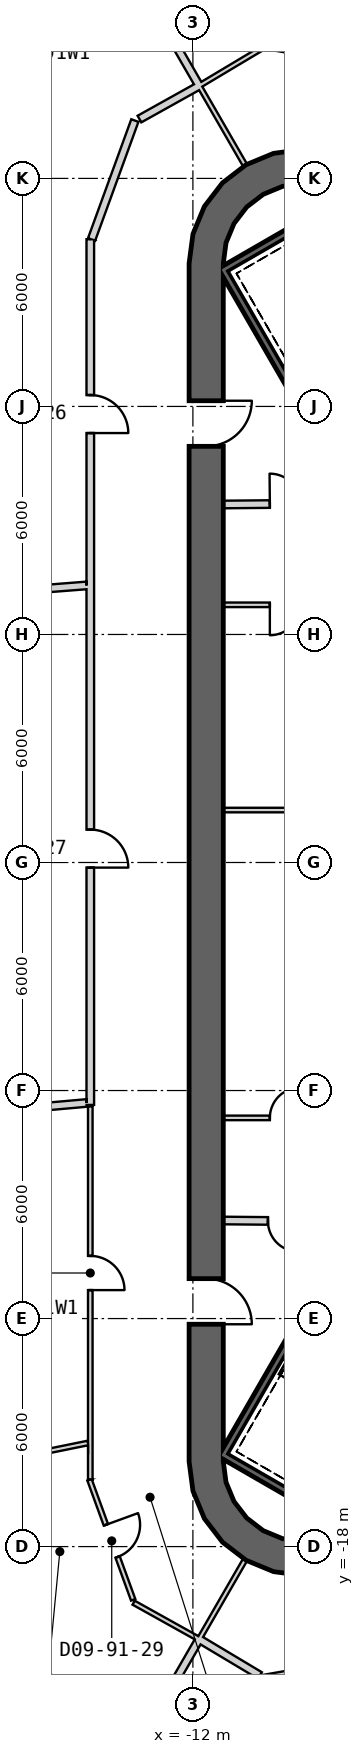
"""IFC4 building model, lengths in metres.
Left out: names, types, materials, properties, quantities, classifications, styles, units other than length and angle.
Written with IfcOpenShell. Run it as: python <this file> out.ifc"""

import sys

from ifc_helpers import new_model, si_unit, direction, frame, frame_2d, origin, place, context, subcontext, project, spatial, polyline, rectangle, outline, extrude, element, fill, save


model = new_model("IFC4")
c1 = context("Model", 3, precision=1e-05, world=origin(), true_north=direction((0.0, 1.0)))
c2 = subcontext(c1, "Body", "Model", "MODEL_VIEW")
j1 = project(units=[si_unit("LENGTHUNIT", "METRE"), si_unit("PLANEANGLEUNIT", "RADIAN")], contexts=[c1])
p1 = place(None, origin())
s1 = spatial("IfcSite", under=j1, at=p1, CompositionType="ELEMENT")
p2 = place(p1, origin())
s2 = spatial("IfcBuilding", under=s1, at=p2, CompositionType="ELEMENT")
p3 = place(p2, frame((0.0, 0.0, 398.3)))
s3 = spatial("IfcBuildingStorey", under=s2, at=p3, CompositionType="ELEMENT", Elevation=398.3)
p4 = place(p3, frame((-11.65, 15.762, 0.0), z_axis=(0.0, 0.0, 1.0), x_axis=(0.0, -1.0, 0.0)))
e1 = element("IfcWall", 1, at=p4, inside=s3, PredefinedType="SHEAR", context=c2, shape_type="SweptSolid", body=[
    extrude(rectangle(XDim=31.523, YDim=0.9, at=frame_2d((15.762, 0.0))), origin(), (0.0, 0.0, 1.0), 6.5),
])
p5 = place(p4, frame((3.612, 0.0, 0.0)))
e2 = element("IfcOpeningElement", 2, at=p5, cuts=e1, PredefinedType="OPENING", context=c2, shape_type="SweptSolid", body=[
    extrude(rectangle(XDim=1.2, YDim=2.4, at=frame_2d((0.6, 1.2))), frame((0.0, 0.46, 0.0), z_axis=(0.0, -1.0, 0.0), x_axis=(1.0, 0.0, 0.0)), (0.0, 0.0, 1.0), 0.92),
])
p6 = place(p4, frame((26.712, 0.0, 0.0)))
e3 = element("IfcOpeningElement", 3, at=p6, cuts=e1, PredefinedType="OPENING", context=c2, shape_type="SweptSolid", body=[
    extrude(rectangle(XDim=1.2, YDim=2.4, at=frame_2d((0.6, 1.2))), frame((0.0, 0.46, 0.0), z_axis=(0.0, -1.0, 0.0), x_axis=(1.0, 0.0, 0.0)), (0.0, 0.0, 1.0), 0.92),
])
p7 = place(p3, origin())
e4 = element("IfcWall", 4, at=p7, inside=s3, PredefinedType="SHEAR", context=c2, shape_type="SweptSolid", body=[
    extrude(outline(polyline([(-7.6, 18.36), (-8.323, 18.659), (-9.1, 18.762), (-9.876, 18.659), (-10.6, 18.36), (-11.221, 17.883), (-11.698, 17.262), (-11.998, 16.538), (-12.1, 15.762), (-11.2, 15.762), (-11.128, 16.305), (-10.919, 16.812), (-10.585, 17.247), (-10.15, 17.58), (-9.644, 17.79), (-9.1, 17.862), (-8.556, 17.79), (-8.05, 17.58), (-7.6, 18.36)])), origin(), (0.0, 0.0, 1.0), 6.5),
])
p8 = place(p3, origin())
e5 = element("IfcWall", 5, at=p8, inside=s3, PredefinedType="SHEAR", context=c2, shape_type="SweptSolid", body=[
    extrude(outline(polyline([(-12.1, -15.762), (-11.998, -16.538), (-11.698, -17.262), (-11.221, -17.883), (-10.6, -18.36), (-9.876, -18.659), (-9.1, -18.762), (-8.323, -18.659), (-7.6, -18.36), (-8.05, -17.58), (-8.556, -17.79), (-9.1, -17.862), (-9.644, -17.79), (-10.15, -17.58), (-10.585, -17.247), (-10.919, -16.812), (-11.128, -16.305), (-11.2, -15.762), (-12.1, -15.762)])), origin(), (0.0, 0.0, 1.0), 6.5),
])
p9 = place(p3, frame((-11.245, 15.678, -0.3), z_axis=(0.0, 0.0, 1.0), x_axis=(0.499977274689, -0.866038523851, 0.0)))
e6 = element("IfcWall", 6, at=p9, inside=s3, PredefinedType="SHEAR", context=c2, shape_type="SweptSolid", body=[
    extrude(rectangle(XDim=8.1, YDim=0.2, at=frame_2d((4.05, 0.0))), origin(), (0.0, 0.0, 1.0), 6.5),
])
for number, where, z_axis, x_axis in (
    (7, (-7.818, 17.541, -0.3), (0.0, 0.0, 1.0), (-0.866, -0.5, 0.0)),
    (8, (-11.282, -15.541, -0.3), (0.0, 0.0, 1.0), (0.866, -0.5, 0.0)),
):
    element("IfcWall", number, at=place(p3, frame(where, z_axis=z_axis, x_axis=x_axis)), inside=s3, PredefinedType="SHEAR", context=c2, shape_type="SweptSolid", body=[
        extrude(rectangle(XDim=3.8, YDim=0.2, at=frame_2d((1.9, 0.0))), origin(), (0.0, 0.0, 1.0), 6.5),
    ])
p10 = place(p3, frame((-7.196, -8.663, -0.3), z_axis=(0.0, 0.0, 1.0), x_axis=(-0.499997992926, -0.866026562566, 0.0)))
e9 = element("IfcWall", 9, at=p10, inside=s3, PredefinedType="SHEAR", context=c2, shape_type="SweptSolid", body=[
    extrude(rectangle(XDim=7.9, YDim=0.2, at=frame_2d((3.95, 0.0))), origin(), (0.0, 0.0, 1.0), 6.5),
])
p11 = place(p3, frame((-7.95, 6.78, 0.0), z_axis=(0.0, 0.0, 1.0), x_axis=(-1.0, 0.0, 0.0)))
e10 = element("IfcWall", 10, at=p11, inside=s3, PredefinedType="PARTITIONING", context=c2, shape_type="SweptSolid", body=[
    extrude(rectangle(XDim=3.25, YDim=0.12, at=frame_2d((1.625, 0.0))), origin(), (0.0, 0.0, 1.0), 6.2),
])
p12 = place(p11, frame((1.225, 0.0, 0.0)))
e11 = element("IfcOpeningElement", 11, at=p12, cuts=e10, PredefinedType="OPENING", context=c2, shape_type="SweptSolid", body=[
    extrude(rectangle(XDim=0.8, YDim=2.1, at=frame_2d((0.4, 1.05))), frame((0.0, 0.07, 0.0), z_axis=(0.0, -1.0, 0.0), x_axis=(1.0, 0.0, 0.0)), (0.0, 0.0, 1.0), 0.14),
])
p13 = place(p3, frame((-7.85, 9.451, 0.0), z_axis=(0.0, 0.0, 1.0), x_axis=(-0.999957167047, -0.009255488683, 0.0)))
e12 = element("IfcWall", 12, at=p13, inside=s3, PredefinedType="PARTITIONING", context=c2, shape_type="SweptSolid", body=[
    extrude(rectangle(XDim=3.35, YDim=0.2, at=frame_2d((1.675, 0.0))), origin(), (0.0, 0.0, 1.0), 6.2),
])
p14 = place(p13, frame((1.325, 0.0, 0.0)))
e13 = element("IfcOpeningElement", 13, at=p14, cuts=e12, PredefinedType="OPENING", context=c2, shape_type="SweptSolid", body=[
    extrude(rectangle(XDim=0.8, YDim=2.1, at=frame_2d((0.4, 1.05))), frame((0.0, 0.11, 0.0), z_axis=(0.0, -1.0, 0.0), x_axis=(1.0, 0.0, 0.0)), (0.0, 0.0, 1.0), 0.22),
])
p15 = place(p3, frame((-7.95, 1.38, 0.0), z_axis=(0.0, 0.0, 1.0), x_axis=(-1.0, 0.0, 0.0)))
e14 = element("IfcWall", 14, at=p15, inside=s3, PredefinedType="PARTITIONING", context=c2, shape_type="SweptSolid", body=[
    extrude(rectangle(XDim=3.25, YDim=0.12, at=frame_2d((1.625, 0.0))), origin(), (0.0, 0.0, 1.0), 6.2),
])
p16 = place(p3, frame((-11.2, -6.72, 0.0), z_axis=(0.0, 0.0, 1.0), x_axis=(1.0, 0.0, 0.0)))
e15 = element("IfcWall", 15, at=p16, inside=s3, PredefinedType="PARTITIONING", context=c2, shape_type="SweptSolid", body=[
    extrude(rectangle(XDim=3.25, YDim=0.12, at=frame_2d((1.625, 0.0))), origin(), (0.0, 0.0, 1.0), 6.2),
])
p17 = place(p16, frame((1.225, 0.0, 0.0)))
e16 = element("IfcOpeningElement", 16, at=p17, cuts=e15, PredefinedType="OPENING", context=c2, shape_type="SweptSolid", body=[
    extrude(rectangle(XDim=0.8, YDim=2.1, at=frame_2d((0.4, 1.05))), frame((0.0, 0.07, 0.0), z_axis=(0.0, -1.0, 0.0), x_axis=(1.0, 0.0, 0.0)), (0.0, 0.0, 1.0), 0.14),
])
p18 = place(p3, frame((-11.2, -9.42, 0.0), z_axis=(0.0, 0.0, 1.0), x_axis=(0.999957467379, -0.009222983926, 0.0)))
e17 = element("IfcWall", 17, at=p18, inside=s3, PredefinedType="PARTITIONING", context=c2, shape_type="SweptSolid", body=[
    extrude(rectangle(XDim=3.15, YDim=0.2, at=frame_2d((1.575, 0.0))), origin(), (0.0, 0.0, 1.0), 6.2),
])
p19 = place(p18, frame((1.175, 0.0, 0.0)))
e18 = element("IfcOpeningElement", 18, at=p19, cuts=e17, PredefinedType="OPENING", context=c2, shape_type="SweptSolid", body=[
    extrude(rectangle(XDim=0.8, YDim=2.1, at=frame_2d((0.4, 1.05))), frame((0.0, 0.11, 0.0), z_axis=(0.0, -1.0, 0.0), x_axis=(1.0, 0.0, 0.0)), (0.0, 0.0, 1.0), 0.22),
])
p20 = place(p3, frame((-14.7, 16.399, 0.0), z_axis=(0.0, 0.0, 1.0), x_axis=(0.0, -1.0, 0.0)))
e19 = element("IfcWall", 19, at=p20, inside=s3, PredefinedType="PARTITIONING", context=c2, shape_type="SweptSolid", body=[
    extrude(rectangle(XDim=9.078, YDim=0.2, at=frame_2d((4.539, 0.0))), origin(), (0.0, 0.0, 1.0), 5.57),
])
p21 = place(p20, frame((4.1, 0.0, 0.0)))
e20 = element("IfcOpeningElement", 20, at=p21, cuts=e19, PredefinedType="OPENING", context=c2, shape_type="SweptSolid", body=[
    extrude(rectangle(XDim=1.0, YDim=2.1, at=frame_2d((0.5, 1.05))), frame((0.0, 0.11, 0.0), z_axis=(0.0, -1.0, 0.0), x_axis=(1.0, 0.0, 0.0)), (0.0, 0.0, 1.0), 0.22),
])
p22 = place(p3, frame((-14.7, 7.322, 0.0), z_axis=(0.0, 0.0, 1.0), x_axis=(0.0, -1.0, 0.0)))
e21 = element("IfcWall", 21, at=p22, inside=s3, PredefinedType="PARTITIONING", context=c2, shape_type="SweptSolid", body=[
    extrude(rectangle(XDim=13.701, YDim=0.2, at=frame_2d((6.851, 0.0))), origin(), (0.0, 0.0, 1.0), 5.67),
])
p23 = place(p22, frame((6.456, 0.0, 0.0)))
e22 = element("IfcOpeningElement", 22, at=p23, cuts=e21, PredefinedType="OPENING", context=c2, shape_type="SweptSolid", body=[
    extrude(rectangle(XDim=1.0, YDim=2.1, at=frame_2d((0.5, 1.05))), frame((0.0, 0.11, 0.0), z_axis=(0.0, -1.0, 0.0), x_axis=(1.0, 0.0, 0.0)), (0.0, 0.0, 1.0), 0.22),
])
p24 = place(p3, frame((-13.527, 19.522, 0.0), z_axis=(0.0, 0.0, 1.0), x_axis=(-0.341978542333, -0.939707761266, 0.0)))
e23 = element("IfcWall", 23, at=p24, inside=s3, PredefinedType="PARTITIONING", context=c2, shape_type="SweptSolid", body=[
    extrude(rectangle(XDim=3.33, YDim=0.2, at=frame_2d((1.665, 0.0))), origin(), (0.0, 0.0, 1.0), 5.57),
])
p25 = place(p3, frame((-11.808, 20.452, 0.0), z_axis=(0.0, 0.0, 1.0), x_axis=(-0.873514477635, -0.486798169021, 0.0)))
e24 = element("IfcWall", 24, at=p25, inside=s3, PredefinedType="PARTITIONING", context=c2, shape_type="SweptSolid", body=[
    extrude(rectangle(XDim=1.83, YDim=0.2, at=frame_2d((0.915, 0.0))), origin(), (0.0, 0.0, 1.0), 5.57),
])
p26 = place(p3, frame((-14.7, -6.419, 0.0), z_axis=(0.0, 0.0, 1.0), x_axis=(0.0, -1.0, 0.0)))
e25 = element("IfcWall", 25, at=p26, inside=s3, PredefinedType="PARTITIONING", context=c2, shape_type="SweptSolid", body=[
    extrude(rectangle(XDim=8.835, YDim=0.12, at=frame_2d((4.418, 0.0))), origin(), (0.0, 0.0, 1.0), 5.57),
])
p27 = place(p26, frame((3.932, 0.0, 0.0)))
e26 = element("IfcOpeningElement", 26, at=p27, cuts=e25, PredefinedType="OPENING", context=c2, shape_type="SweptSolid", body=[
    extrude(rectangle(XDim=0.9, YDim=2.1, at=frame_2d((0.45, 1.05))), frame((0.0, 0.07, 0.0), z_axis=(0.0, -1.0, 0.0), x_axis=(1.0, 0.0, 0.0)), (0.0, 0.0, 1.0), 0.14),
])
p28 = place(p3, frame((-14.7, -15.255, 0.0), z_axis=(0.0, 0.0, 1.0), x_axis=(0.0, -1.0, 0.0)))
e27 = element("IfcWall", 27, at=p28, inside=s3, PredefinedType="PARTITIONING", context=c2, shape_type="SweptSolid", body=[
    extrude(rectangle(XDim=0.985, YDim=0.12, at=frame_2d((0.492, 0.0))), origin(), (0.0, 0.0, 1.0), 6.2),
])
p29 = place(p3, frame((-13.559, -19.476, 0.0), z_axis=(0.0, 0.0, 1.0), x_axis=(0.873536168316, -0.486759245052, 0.0)))
e28 = element("IfcWall", 28, at=p29, inside=s3, PredefinedType="PARTITIONING", context=c2, shape_type="SweptSolid", body=[
    extrude(rectangle(XDim=2.005, YDim=0.12, at=frame_2d((1.002, 0.0))), origin(), (0.0, 0.0, 1.0), 5.57),
])
p30 = place(p3, frame((-14.72, -16.243, 0.0), z_axis=(0.0, 0.0, 1.0), x_axis=(0.342046381322, -0.939683070521, 0.0)))
e29 = element("IfcWall", 29, at=p30, inside=s3, PredefinedType="PARTITIONING", context=c2, shape_type="SweptSolid", body=[
    extrude(rectangle(XDim=3.36, YDim=0.12, at=frame_2d((1.68, 0.0))), origin(), (0.0, 0.0, 1.0), 5.57),
])
p31 = place(p30, frame((1.26, 0.0, 0.0)))
e30 = element("IfcOpeningElement", 30, at=p31, cuts=e29, PredefinedType="OPENING", context=c2, shape_type="SweptSolid", body=[
    extrude(rectangle(XDim=0.9, YDim=2.1, at=frame_2d((0.45, 1.05))), frame((0.0, 0.07, 0.0), z_axis=(0.0, -1.0, 0.0), x_axis=(1.0, 0.0, 0.0)), (0.0, 0.0, 1.0), 0.14),
])
for number, where, z_axis, x_axis in (
    (31, (-11.849, 20.463, 0.0), (0.0, 0.0, 1.0), (0.5, -0.866, 0.0)),
    (32, (-10.549, -18.212, 0.0), (0.0, 0.0, 1.0), (-0.5, -0.866, 0.0)),
):
    element("IfcWall", number, at=place(p3, frame(where, z_axis=z_axis, x_axis=x_axis)), inside=s3, PredefinedType="PARTITIONING", context=c2, shape_type="SweptSolid", body=[
        extrude(rectangle(XDim=2.6, YDim=0.12, at=frame_2d((1.3, 0.0))), origin(), (0.0, 0.0, 1.0), 5.57),
    ])
p32 = place(p3, frame((-14.8, 7.29, 0.0), z_axis=(0.0, 0.0, 1.0), x_axis=(-0.996965352489, -0.077846553789, 0.0)))
e33 = element("IfcWall", 33, at=p32, inside=s3, PredefinedType="PARTITIONING", context=c2, shape_type="SweptSolid", body=[
    extrude(rectangle(XDim=6.363, YDim=0.2, at=frame_2d((3.182, 0.0))), origin(), (0.0, 0.0, 1.0), 6.2),
])
p33 = place(p3, frame((-15.024, 25.962, 0.0), z_axis=(0.0, 0.0, 1.0), x_axis=(0.499993152284, -0.866029357279, 0.0)))
e34 = element("IfcWall", 34, at=p33, inside=s3, PredefinedType="PARTITIONING", context=c2, shape_type="SweptSolid", body=[
    extrude(rectangle(XDim=6.35, YDim=0.2, at=frame_2d((3.175, 0.0))), origin(), (0.0, 0.0, 1.0), 5.57),
])
p34 = place(p3, frame((-14.8, -6.328, 0.0), z_axis=(0.0, 0.0, 1.0), x_axis=(-0.996081685844, -0.088437973332, 0.0)))
e35 = element("IfcWall", 35, at=p34, inside=s3, PredefinedType="PARTITIONING", context=c2, shape_type="SweptSolid", body=[
    extrude(rectangle(XDim=2.802, YDim=0.2, at=frame_2d((1.401, 0.0))), origin(), (0.0, 0.0, 1.0), 6.2),
])
p35 = place(p3, frame((-17.4, -15.811, 0.0), z_axis=(0.0, 0.0, 1.0), x_axis=(0.979941162084, 0.199287026304, 0.0)))
e36 = element("IfcWall", 36, at=p35, inside=s3, PredefinedType="PARTITIONING", context=c2, shape_type="SweptSolid", body=[
    extrude(rectangle(XDim=2.694, YDim=0.12, at=frame_2d((1.347, 0.0))), origin(), (0.0, 0.0, 1.0), 6.2),
])
p36 = place(p3, frame((-11.849, -20.463, 0.0), z_axis=(0.0, 0.0, 1.0), x_axis=(-0.49997539674, -0.866039608017, 0.0)))
e37 = element("IfcWall", 37, at=p36, inside=s3, PredefinedType="PARTITIONING", context=c2, shape_type="SweptSolid", body=[
    extrude(rectangle(XDim=2.423, YDim=0.2, at=frame_2d((1.211, 0.0))), origin(), (0.0, 0.0, 1.0), 5.57),
])
p37 = place(p3, frame((-10.087, 21.481, 0.0), z_axis=(0.0, 0.0, 1.0), x_axis=(-0.858372726575, -0.513026570728, 0.0)))
e38 = element("IfcWall", 38, at=p37, inside=s3, PredefinedType="PARTITIONING", context=c2, shape_type="SweptSolid", body=[
    extrude(rectangle(XDim=2.005, YDim=0.12, at=frame_2d((1.002, 0.0))), origin(), (0.0, 0.0, 1.0), 5.57),
])
p38 = place(p3, frame((-6.707, 20.87, 0.0), z_axis=(0.0, 0.0, 1.0), x_axis=(-0.984811337603, 0.173627847217, 0.0)))
e39 = element("IfcWall", 39, at=p38, inside=s3, PredefinedType="PARTITIONING", context=c2, shape_type="SweptSolid", body=[
    extrude(rectangle(XDim=3.361, YDim=0.12, at=frame_2d((1.68, 0.0))), origin(), (0.0, 0.0, 1.0), 5.57),
])
p39 = place(p3, frame((-10.143, -21.476, 0.0), z_axis=(0.0, 0.0, 1.0), x_axis=(0.98480864774, 0.173643103339, 0.0)))
e40 = element("IfcWall", 40, at=p39, inside=s3, PredefinedType="PARTITIONING", context=c2, shape_type="SweptSolid", body=[
    extrude(rectangle(XDim=3.329, YDim=0.2, at=frame_2d((1.665, 0.0))), origin(), (0.0, 0.0, 1.0), 5.57),
])
p40 = place(p3, frame((-11.808, -20.452, 0.0), z_axis=(0.0, 0.0, 1.0), x_axis=(0.858362923554, -0.51304297234, 0.0)))
e41 = element("IfcWall", 41, at=p40, inside=s3, PredefinedType="PARTITIONING", context=c2, shape_type="SweptSolid", body=[
    extrude(rectangle(XDim=1.83, YDim=0.2, at=frame_2d((0.915, 0.0))), origin(), (0.0, 0.0, 1.0), 5.57),
])
p41 = place(p14, origin())
e42 = element("IfcDoor", 42, at=p41, inside=s3, OperationType="SINGLE_SWING_RIGHT", PredefinedType="USERDEFINED", context=c2, shape_type="SweptSolid", body=[
    extrude(rectangle(XDim=0.8, YDim=2.1, at=frame_2d((0.4, 1.05))), frame((0.0, 0.025, 0.0), z_axis=(0.0, -1.0, 0.0), x_axis=(1.0, 0.0, 0.0)), (0.0, 0.0, 1.0), 0.05),
])
fill(e13, e42)
p42 = place(p12, origin())
e43 = element("IfcDoor", 43, at=p42, inside=s3, OperationType="SINGLE_SWING_RIGHT", PredefinedType="USERDEFINED", context=c2, shape_type="SweptSolid", body=[
    extrude(rectangle(XDim=0.8, YDim=2.1, at=frame_2d((0.4, 1.05))), frame((0.0, 0.025, 0.0), z_axis=(0.0, -1.0, 0.0), x_axis=(1.0, 0.0, 0.0)), (0.0, 0.0, 1.0), 0.05),
])
fill(e11, e43)
p43 = place(p17, origin())
e44 = element("IfcDoor", 44, at=p43, inside=s3, OperationType="SINGLE_SWING_RIGHT", PredefinedType="USERDEFINED", context=c2, shape_type="SweptSolid", body=[
    extrude(rectangle(XDim=0.8, YDim=2.1, at=frame_2d((0.4, 1.05))), frame((0.0, 0.025, 0.0), z_axis=(0.0, -1.0, 0.0), x_axis=(1.0, 0.0, 0.0)), (0.0, 0.0, 1.0), 0.05),
])
fill(e16, e44)
p44 = place(p19, origin())
e45 = element("IfcDoor", 45, at=p44, inside=s3, OperationType="SINGLE_SWING_RIGHT", PredefinedType="USERDEFINED", context=c2, shape_type="SweptSolid", body=[
    extrude(rectangle(XDim=0.8, YDim=2.1, at=frame_2d((0.4, 1.05))), frame((0.0, 0.025, 0.0), z_axis=(0.0, -1.0, 0.0), x_axis=(1.0, 0.0, 0.0)), (0.0, 0.0, 1.0), 0.05),
])
fill(e18, e45)
p45 = place(p21, origin())
e46 = element("IfcDoor", 46, at=p45, inside=s3, OperationType="SINGLE_SWING_RIGHT", PredefinedType="USERDEFINED", context=c2, shape_type="SweptSolid", body=[
    extrude(rectangle(XDim=1.0, YDim=2.1, at=frame_2d((0.5, 1.05))), frame((0.0, 0.025, 0.0), z_axis=(0.0, -1.0, 0.0), x_axis=(1.0, 0.0, 0.0)), (0.0, 0.0, 1.0), 0.05),
])
fill(e20, e46)
p46 = place(p23, origin())
e47 = element("IfcDoor", 47, at=p46, inside=s3, OperationType="SINGLE_SWING_RIGHT", PredefinedType="USERDEFINED", context=c2, shape_type="SweptSolid", body=[
    extrude(rectangle(XDim=1.0, YDim=2.1, at=frame_2d((0.5, 1.05))), frame((0.0, 0.025, 0.0), z_axis=(0.0, -1.0, 0.0), x_axis=(1.0, 0.0, 0.0)), (0.0, 0.0, 1.0), 0.05),
])
fill(e22, e47)
p47 = place(p27, origin())
e48 = element("IfcDoor", 48, at=p47, inside=s3, OperationType="SINGLE_SWING_RIGHT", PredefinedType="NOTDEFINED", context=c2, shape_type="SweptSolid", body=[
    extrude(rectangle(XDim=0.9, YDim=2.1, at=frame_2d((0.45, 1.05))), frame((0.0, 0.025, 0.0), z_axis=(0.0, -1.0, 0.0), x_axis=(1.0, 0.0, 0.0)), (0.0, 0.0, 1.0), 0.05),
])
fill(e26, e48)
p48 = place(p31, origin())
e49 = element("IfcDoor", 49, at=p48, inside=s3, OperationType="SINGLE_SWING_LEFT", PredefinedType="NOTDEFINED", context=c2, shape_type="SweptSolid", body=[
    extrude(rectangle(XDim=0.9, YDim=2.1, at=frame_2d((0.45, 1.05))), frame((0.0, 0.025, 0.0), z_axis=(0.0, -1.0, 0.0), x_axis=(1.0, 0.0, 0.0)), (0.0, 0.0, 1.0), 0.05),
])
fill(e30, e49)
p49 = place(p5, origin())
e50 = element("IfcDoor", 50, at=p49, inside=s3, OperationType="SINGLE_SWING_LEFT", PredefinedType="USERDEFINED", context=c2, shape_type="SweptSolid", body=[
    extrude(rectangle(XDim=1.2, YDim=2.4, at=frame_2d((0.6, 1.2))), frame((0.0, 0.025, 0.0), z_axis=(0.0, -1.0, 0.0), x_axis=(1.0, 0.0, 0.0)), (0.0, 0.0, 1.0), 0.05),
])
fill(e2, e50)
p50 = place(p6, origin())
e51 = element("IfcDoor", 51, at=p50, inside=s3, OperationType="SINGLE_SWING_RIGHT", PredefinedType="USERDEFINED", context=c2, shape_type="SweptSolid", body=[
    extrude(rectangle(XDim=1.2, YDim=2.4, at=frame_2d((0.6, 1.2))), frame((0.0, 0.025, 0.0), z_axis=(0.0, -1.0, 0.0), x_axis=(1.0, 0.0, 0.0)), (0.0, 0.0, 1.0), 0.05),
])
fill(e3, e51)
save(model, sys.argv[1])
